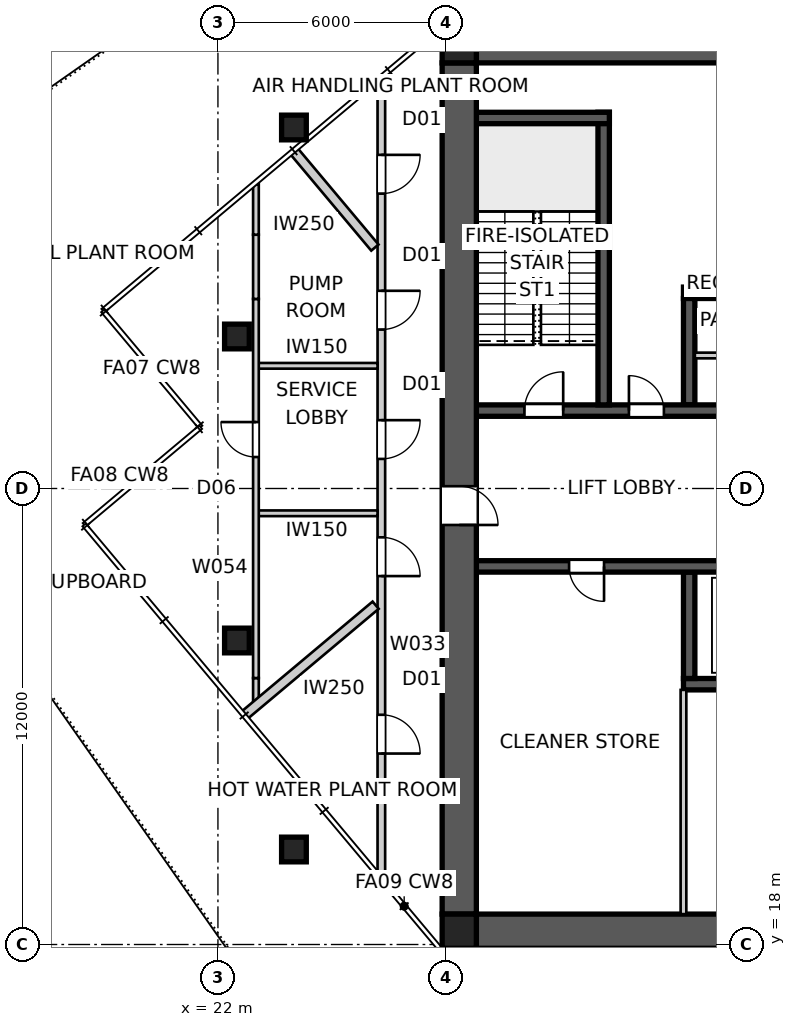
"""IFC4 building model, lengths in metres.
Left out: names, types, materials, properties, quantities, classifications, styles, units other than length and angle.
Written with IfcOpenShell. Run it as: python <this file> out.ifc"""

import sys

from ifc_helpers import new_model, si_unit, direction, frame, frame_2d, origin, origin_2d, place, context, subcontext, project, spatial, polyline, rectangle, outline, extrude, element, fill, save


model = new_model("IFC4")
c1 = context("Model", 3, precision=1e-05, world=origin(), true_north=direction((0.0, 1.0)))
c2 = subcontext(c1, "Body", "Model", "MODEL_VIEW")
j1 = project(units=[si_unit("LENGTHUNIT", "METRE"), si_unit("PLANEANGLEUNIT", "RADIAN")], contexts=[c1])
p1 = place(None, origin())
s1 = spatial("IfcSite", under=j1, at=p1, CompositionType="ELEMENT")
p2 = place(p1, origin())
s2 = spatial("IfcBuilding", under=s1, at=p2, CompositionType="ELEMENT")
p3 = place(p2, frame((0.0, 0.0, 267.6)))
s3 = spatial("IfcBuildingStorey", under=s2, at=p3, CompositionType="ELEMENT", Elevation=267.6)
for number, where, z_axis, x_axis in (
    (1, (28.8, 41.65, 0.0), (0.0, 0.0, 1.0), (1.0, 0.0, 0.0)),
    (2, (51.2, 18.35, 0.0), (0.0, 0.0, 1.0), (-1.0, 0.0, 0.0)),
):
    element("IfcWall", number, at=place(p3, frame(where, z_axis=z_axis, x_axis=x_axis)), inside=s3, PredefinedType="SHEAR", context=c2, shape_type="SweptSolid", body=[
        extrude(outline(polyline([(0.0, -0.45), (22.4, -0.45), (22.4, -0.025), (22.85, -0.025), (22.85, 0.025), (22.4, 0.025), (22.4, 0.45), (0.0, 0.45), (0.0, 0.025), (-0.45, 0.025), (-0.45, -0.025), (0.0, -0.025), (0.0, -0.45)])), origin(), (0.0, 0.0, 1.0), 5.0),
    ])
p4 = place(p3, frame((28.35, 41.2, 0.0), z_axis=(0.0, 0.0, 1.0), x_axis=(0.0, -1.0, 0.0)))
e3 = element("IfcWall", 3, at=p4, inside=s3, PredefinedType="SHEAR", context=c2, shape_type="SweptSolid", body=[
    extrude(outline(polyline([(0.0, -0.45), (22.4, -0.45), (22.4, -0.025), (22.85, -0.025), (22.85, 0.025), (22.4, 0.025), (22.4, 0.45), (0.0, 0.45), (0.0, 0.025), (-0.45, 0.025), (-0.45, -0.025), (0.0, -0.025), (0.0, -0.45)])), origin(), (0.0, 0.0, 1.0), 5.0),
])
p5 = place(p4, frame((11.14, 0.0, 0.0)))
e4 = element("IfcOpeningElement", 4, at=p5, cuts=e3, PredefinedType="OPENING", context=c2, shape_type="SweptSolid", body=[
    extrude(rectangle(XDim=1.02, YDim=2.4, at=frame_2d((0.51, 1.2))), frame((0.0, 0.46, 0.0), z_axis=(0.0, -1.0, 0.0), x_axis=(1.0, 0.0, 0.0)), (0.0, 0.0, 1.0), 0.92),
])
p6 = place(p3, frame((28.8, 32.05, 0.0), z_axis=(0.0, 0.0, 1.0), x_axis=(1.0, 0.0, 0.0)))
e5 = element("IfcWall", 5, at=p6, inside=s3, PredefinedType="SHEAR", context=c2, shape_type="SweptSolid", body=[
    extrude(rectangle(XDim=22.4, YDim=0.3, at=frame_2d((11.2, 0.0))), origin(), (0.0, 0.0, 1.0), 5.0),
])
p7 = place(p6, frame((19.04, 0.0, 0.0)))
e6 = element("IfcOpeningElement", 6, at=p7, cuts=e5, PredefinedType="OPENING", context=c2, shape_type="SweptSolid", body=[
    extrude(rectangle(XDim=0.92, YDim=2.1, at=frame_2d((0.46, 1.05))), frame((0.0, 0.16, 0.0), z_axis=(0.0, -1.0, 0.0), x_axis=(1.0, 0.0, 0.0)), (0.0, 0.0, 1.0), 0.32),
])
p8 = place(p6, frame((1.265, 0.0, 0.0)))
e7 = element("IfcOpeningElement", 7, at=p8, cuts=e5, PredefinedType="OPENING", context=c2, shape_type="SweptSolid", body=[
    extrude(rectangle(XDim=1.02, YDim=2.1, at=frame_2d((0.51, 1.05))), frame((0.0, 0.16, 0.0), z_axis=(0.0, -1.0, 0.0), x_axis=(1.0, 0.0, 0.0)), (0.0, 0.0, 1.0), 0.32),
])
p9 = place(p6, frame((4.015, 0.0, 0.0)))
e8 = element("IfcOpeningElement", 8, at=p9, cuts=e5, PredefinedType="OPENING", context=c2, shape_type="SweptSolid", body=[
    extrude(rectangle(XDim=0.92, YDim=2.1, at=frame_2d((0.46, 1.05))), frame((0.0, 0.16, 0.0), z_axis=(0.0, -1.0, 0.0), x_axis=(1.0, 0.0, 0.0)), (0.0, 0.0, 1.0), 0.32),
])
p10 = place(p6, frame((7.015, 0.0, 0.0)))
e9 = element("IfcOpeningElement", 9, at=p10, cuts=e5, PredefinedType="OPENING", context=c2, shape_type="SweptSolid", body=[
    extrude(rectangle(XDim=0.92, YDim=2.1, at=frame_2d((0.46, 1.05))), frame((0.0, 0.16, 0.0), z_axis=(0.0, -1.0, 0.0), x_axis=(1.0, 0.0, 0.0)), (0.0, 0.0, 1.0), 0.32),
])
p11 = place(p6, frame((9.34, 0.0, 0.0)))
e10 = element("IfcOpeningElement", 10, at=p11, cuts=e5, PredefinedType="OPENING", context=c2, shape_type="SweptSolid", body=[
    extrude(rectangle(XDim=0.92, YDim=2.1, at=frame_2d((0.46, 1.05))), frame((0.0, 0.16, 0.0), z_axis=(0.0, -1.0, 0.0), x_axis=(1.0, 0.0, 0.0)), (0.0, 0.0, 1.0), 0.32),
])
p12 = place(p6, frame((12.05, 0.0, 0.0)))
e11 = element("IfcOpeningElement", 11, at=p12, cuts=e5, PredefinedType="OPENING", context=c2, shape_type="SweptSolid", body=[
    extrude(rectangle(XDim=1.1, YDim=2.1, at=frame_2d((0.55, 1.05))), frame((0.0, 0.16, 0.0), z_axis=(0.0, -1.0, 0.0), x_axis=(1.0, 0.0, 0.0)), (0.0, 0.0, 1.0), 0.32),
])
p13 = place(p6, frame((14.85, 0.0, 0.0)))
e12 = element("IfcOpeningElement", 12, at=p13, cuts=e5, PredefinedType="OPENING", context=c2, shape_type="SweptSolid", body=[
    extrude(rectangle(XDim=1.1, YDim=2.1, at=frame_2d((0.55, 1.05))), frame((0.0, 0.16, 0.0), z_axis=(0.0, -1.0, 0.0), x_axis=(1.0, 0.0, 0.0)), (0.0, 0.0, 1.0), 0.32),
])
p14 = place(p3, frame((51.2, 27.95, 0.0), z_axis=(0.0, 0.0, 1.0), x_axis=(-1.0, 0.0, 0.0)))
e13 = element("IfcWall", 13, at=p14, inside=s3, PredefinedType="SHEAR", context=c2, shape_type="SweptSolid", body=[
    extrude(rectangle(XDim=22.4, YDim=0.3, at=frame_2d((11.2, 0.0))), origin(), (0.0, 0.0, 1.0), 5.0),
])
p15 = place(p14, frame((19.04, 0.0, 0.0)))
e14 = element("IfcOpeningElement", 14, at=p15, cuts=e13, PredefinedType="OPENING", context=c2, shape_type="SweptSolid", body=[
    extrude(rectangle(XDim=0.92, YDim=2.1, at=frame_2d((0.46, 1.05))), frame((0.0, 0.16, 0.0), z_axis=(0.0, -1.0, 0.0), x_axis=(1.0, 0.0, 0.0)), (0.0, 0.0, 1.0), 0.32),
])
p16 = place(p14, frame((1.265, 0.0, 0.0)))
e15 = element("IfcOpeningElement", 15, at=p16, cuts=e13, PredefinedType="OPENING", context=c2, shape_type="SweptSolid", body=[
    extrude(rectangle(XDim=1.02, YDim=2.1, at=frame_2d((0.51, 1.05))), frame((0.0, 0.16, 0.0), z_axis=(0.0, -1.0, 0.0), x_axis=(1.0, 0.0, 0.0)), (0.0, 0.0, 1.0), 0.32),
])
p17 = place(p14, frame((4.015, 0.0, 0.0)))
e16 = element("IfcOpeningElement", 16, at=p17, cuts=e13, PredefinedType="OPENING", context=c2, shape_type="SweptSolid", body=[
    extrude(rectangle(XDim=0.92, YDim=2.1, at=frame_2d((0.46, 1.05))), frame((0.0, 0.16, 0.0), z_axis=(0.0, -1.0, 0.0), x_axis=(1.0, 0.0, 0.0)), (0.0, 0.0, 1.0), 0.32),
])
p18 = place(p14, frame((9.79, 0.0, 0.0)))
e17 = element("IfcOpeningElement", 17, at=p18, cuts=e13, PredefinedType="OPENING", context=c2, shape_type="SweptSolid", body=[
    extrude(rectangle(XDim=0.92, YDim=2.1, at=frame_2d((0.46, 1.05))), frame((0.0, 0.16, 0.0), z_axis=(0.0, -1.0, 0.0), x_axis=(1.0, 0.0, 0.0)), (0.0, 0.0, 1.0), 0.32),
])
p19 = place(p14, frame((6.115, 0.0, 0.0)))
e18 = element("IfcOpeningElement", 18, at=p19, cuts=e13, PredefinedType="OPENING", context=c2, shape_type="SweptSolid", body=[
    extrude(rectangle(XDim=0.92, YDim=2.1, at=frame_2d((0.46, 1.05))), frame((0.0, 0.16, 0.0), z_axis=(0.0, -1.0, 0.0), x_axis=(1.0, 0.0, 0.0)), (0.0, 0.0, 1.0), 0.32),
])
p20 = place(p14, frame((12.05, 0.0, 0.0)))
e19 = element("IfcOpeningElement", 19, at=p20, cuts=e13, PredefinedType="OPENING", context=c2, shape_type="SweptSolid", body=[
    extrude(rectangle(XDim=1.1, YDim=2.1, at=frame_2d((0.55, 1.05))), frame((0.0, 0.16, 0.0), z_axis=(0.0, -1.0, 0.0), x_axis=(1.0, 0.0, 0.0)), (0.0, 0.0, 1.0), 0.32),
])
p21 = place(p14, frame((14.85, 0.0, 0.0)))
e20 = element("IfcOpeningElement", 20, at=p21, cuts=e13, PredefinedType="OPENING", context=c2, shape_type="SweptSolid", body=[
    extrude(rectangle(XDim=1.1, YDim=2.1, at=frame_2d((0.55, 1.05))), frame((0.0, 0.16, 0.0), z_axis=(0.0, -1.0, 0.0), x_axis=(1.0, 0.0, 0.0)), (0.0, 0.0, 1.0), 0.32),
])
for number, where, z_axis, x_axis in (
    (21, (34.25, 35.15, 0.0), (0.0, 0.0, 1.0), (1.0, 0.0, 0.0)),
    (22, (45.75, 24.85, 0.0), (0.0, 0.0, 1.0), (-1.0, 0.0, 0.0)),
):
    element("IfcWall", number, at=place(p3, frame(where, z_axis=z_axis, x_axis=x_axis)), inside=s3, PredefinedType="SHEAR", context=c2, shape_type="SweptSolid", body=[
        extrude(rectangle(XDim=11.5, YDim=0.3, at=frame_2d((5.75, 0.0))), origin(), (0.0, 0.0, 1.0), 5.0),
    ])
for number, where, z_axis, x_axis in (
    (23, (34.4, 32.2, 0.0), (0.0, 0.0, 1.0), (0.0, 1.0, 0.0)),
    (24, (34.4, 27.8, 0.0), (0.0, 0.0, 1.0), (0.0, -1.0, 0.0)),
):
    element("IfcWall", number, at=place(p3, frame(where, z_axis=z_axis, x_axis=x_axis)), inside=s3, PredefinedType="SHEAR", context=c2, shape_type="SweptSolid", body=[
        extrude(rectangle(XDim=2.8, YDim=0.3, at=frame_2d((1.4, 0.0))), origin(), (0.0, 0.0, 1.0), 5.0),
    ])
p22 = place(p3, frame((32.15, 32.2, 0.0), z_axis=(0.0, 0.0, 1.0), x_axis=(0.0, 1.0, 0.0)))
e25 = element("IfcWall", 25, at=p22, inside=s3, PredefinedType="SHEAR", context=c2, shape_type="SweptSolid", body=[
    extrude(rectangle(XDim=7.7, YDim=0.3, at=frame_2d((3.85, 0.0))), origin(), (0.0, 0.0, 1.0), 5.0),
])
p23 = place(p3, frame((28.8, 39.75, 0.0), z_axis=(0.0, 0.0, 1.0), x_axis=(1.0, 0.0, 0.0)))
e26 = element("IfcWall", 26, at=p23, inside=s3, PredefinedType="SHEAR", context=c2, shape_type="SweptSolid", body=[
    extrude(rectangle(XDim=3.5, YDim=0.3, at=frame_2d((1.75, 0.0))), origin(), (0.0, 0.0, 1.0), 5.0),
])
for number, where, z_axis, x_axis in (
    (27, (28.35, 18.35, 0.0), (0.0, 0.0, 1.0), (1.0, 0.0, 0.0)),
    (28, (28.35, 41.65, 0.0), (0.0, 0.0, 1.0), (1.0, 0.0, 0.0)),
):
    element("IfcColumn", number, at=place(p3, frame(where, z_axis=z_axis, x_axis=x_axis)), inside=s3, PredefinedType="COLUMN", context=c2, shape_type="SweptSolid", body=[
        extrude(rectangle(XDim=0.9, YDim=0.9, at=origin_2d()), origin(), (0.0, 0.0, 1.0), 5.0),
    ])
for number, where, z_axis, x_axis in (
    (29, (24.0, 39.5, 0.0), (0.0, 0.0, 1.0), (1.0, 0.0, 0.0)),
    (30, (22.5, 34.0, 0.0), (0.0, 0.0, 1.0), (1.0, 0.0, 0.0)),
    (31, (22.5, 26.0, 0.0), (0.0, 0.0, 1.0), (1.0, 0.0, 0.0)),
    (32, (24.0, 20.5, 0.0), (0.0, 0.0, 1.0), (1.0, 0.0, 0.0)),
):
    element("IfcColumn", number, at=place(p3, frame(where, z_axis=z_axis, x_axis=x_axis)), inside=s3, PredefinedType="COLUMN", context=c2, shape_type="SweptSolid", body=[
        extrude(rectangle(XDim=0.65, YDim=0.65, at=origin_2d()), origin(), (0.0, 0.0, 1.0), 5.0),
    ])
p24 = place(p3, frame((26.3, 40.775, 0.0), z_axis=(0.0, 0.0, 1.0), x_axis=(0.0, -1.0, 0.0)))
e33 = element("IfcWall", 33, at=p24, inside=s3, PredefinedType="PARTITIONING", context=c2, shape_type="SweptSolid", body=[
    extrude(rectangle(XDim=20.988, YDim=0.2, at=frame_2d((10.494, 0.0))), origin(), (0.0, 0.0, 1.0), 4.85),
])
p25 = place(p24, frame((16.729, 0.0, 0.0)))
e34 = element("IfcOpeningElement", 34, at=p25, cuts=e33, PredefinedType="OPENING", context=c2, shape_type="SweptSolid", body=[
    extrude(rectangle(XDim=1.02, YDim=2.34, at=frame_2d((0.51, 1.17))), frame((0.0, 0.11, 0.0), z_axis=(0.0, -1.0, 0.0), x_axis=(1.0, 0.0, 0.0)), (0.0, 0.0, 1.0), 0.22),
])
p26 = place(p24, frame((1.995, 0.0, 0.0)))
e35 = element("IfcOpeningElement", 35, at=p26, cuts=e33, PredefinedType="OPENING", context=c2, shape_type="SweptSolid", body=[
    extrude(rectangle(XDim=1.02, YDim=2.34, at=frame_2d((0.51, 1.17))), frame((0.0, 0.11, 0.0), z_axis=(0.0, -1.0, 0.0), x_axis=(1.0, 0.0, 0.0)), (0.0, 0.0, 1.0), 0.22),
])
p27 = place(p24, frame((8.976, 0.0, 0.0)))
e36 = element("IfcOpeningElement", 36, at=p27, cuts=e33, PredefinedType="OPENING", context=c2, shape_type="SweptSolid", body=[
    extrude(rectangle(XDim=1.02, YDim=2.34, at=frame_2d((0.51, 1.17))), frame((0.0, 0.11, 0.0), z_axis=(0.0, -1.0, 0.0), x_axis=(1.0, 0.0, 0.0)), (0.0, 0.0, 1.0), 0.22),
])
p28 = place(p24, frame((5.572, 0.0, 0.0)))
e37 = element("IfcOpeningElement", 37, at=p28, cuts=e33, PredefinedType="OPENING", context=c2, shape_type="SweptSolid", body=[
    extrude(rectangle(XDim=1.02, YDim=2.34, at=frame_2d((0.51, 1.17))), frame((0.0, 0.11, 0.0), z_axis=(0.0, -1.0, 0.0), x_axis=(1.0, 0.0, 0.0)), (0.0, 0.0, 1.0), 0.22),
])
p29 = place(p24, frame((12.06, 0.0, 0.0)))
e38 = element("IfcOpeningElement", 38, at=p29, cuts=e33, PredefinedType="OPENING", context=c2, shape_type="SweptSolid", body=[
    extrude(rectangle(XDim=1.02, YDim=2.34, at=frame_2d((0.51, 1.17))), frame((0.0, 0.11, 0.0), z_axis=(0.0, -1.0, 0.0), x_axis=(1.0, 0.0, 0.0)), (0.0, 0.0, 1.0), 0.22),
])
p30 = place(p3, frame((23.991, 38.889, 0.0), z_axis=(0.0, 0.0, 1.0), x_axis=(0.642756724565, -0.766070357753, 0.0)))
e39 = element("IfcWall", 39, at=p30, inside=s3, PredefinedType="PARTITIONING", context=c2, shape_type="SweptSolid", body=[
    extrude(rectangle(XDim=3.328, YDim=0.25, at=frame_2d((1.664, 0.0))), origin(), (0.0, 0.0, 1.0), 4.85),
])
p31 = place(p3, frame((22.69, 24.026, 0.0), z_axis=(0.0, 0.0, 1.0), x_axis=(0.766036989917, 0.642796491962, 0.0)))
e40 = element("IfcWall", 40, at=p31, inside=s3, PredefinedType="PARTITIONING", context=c2, shape_type="SweptSolid", body=[
    extrude(rectangle(XDim=4.517, YDim=0.25, at=frame_2d((2.258, 0.0))), origin(), (0.0, 0.0, 1.0), 4.85),
])
p32 = place(p3, frame((34.25, 18.8, 0.0), z_axis=(0.0, 0.0, 1.0), x_axis=(0.0, 1.0, 0.0)))
e41 = element("IfcWall", 41, at=p32, inside=s3, PredefinedType="SOLIDWALL", context=c2, shape_type="SweptSolid", body=[
    extrude(rectangle(XDim=5.9, YDim=0.15, at=frame_2d((2.95, 0.0))), origin(), (0.0, 0.0, 1.0), 4.85),
])
for number, where, z_axis, x_axis in (
    (42, (23.0, 33.229, 0.0), (0.0, 0.0, 1.0), (1.0, 0.0, 0.0)),
    (43, (26.2, 29.348, 0.0), (0.0, 0.0, 1.0), (-1.0, 0.0, 0.0)),
):
    element("IfcWall", number, at=place(p3, frame(where, z_axis=z_axis, x_axis=x_axis)), inside=s3, PredefinedType="SOLIDWALL", context=c2, shape_type="SweptSolid", body=[
        extrude(rectangle(XDim=3.2, YDim=0.15, at=frame_2d((1.6, 0.0))), origin(), (0.0, 0.0, 1.0), 4.85),
    ])
p33 = place(p3, frame((23.0, 24.286, 0.0), z_axis=(0.0, 0.0, 1.0), x_axis=(0.0, 1.0, 0.0)))
e44 = element("IfcWall", 44, at=p33, inside=s3, PredefinedType="SOLIDWALL", context=c2, shape_type="SweptSolid", body=[
    extrude(rectangle(XDim=0.726, YDim=0.15, at=frame_2d((0.363, 0.0))), origin(), (0.0, 0.0, 1.0), 3.85),
])
p34 = place(p3, frame((23.0, 25.012, 0.0), z_axis=(0.0, 0.0, 1.0), x_axis=(0.0, 1.0, 0.0)))
e45 = element("IfcWall", 45, at=p34, inside=s3, PredefinedType="SOLIDWALL", context=c2, shape_type="SweptSolid", body=[
    extrude(rectangle(XDim=9.977, YDim=0.15, at=frame_2d((4.988, 0.0))), origin(), (0.0, 0.0, 1.0), 4.85),
])
p35 = place(p34, frame((5.816, 0.0, 0.0)))
e46 = element("IfcOpeningElement", 46, at=p35, cuts=e45, PredefinedType="OPENING", context=c2, shape_type="SweptSolid", body=[
    extrude(rectangle(XDim=0.92, YDim=2.1, at=frame_2d((0.46, 1.05))), frame((0.0, 0.085, 0.0), z_axis=(0.0, -1.0, 0.0), x_axis=(1.0, 0.0, 0.0)), (0.0, 0.0, 1.0), 0.17),
])
p36 = place(p3, frame((23.0, 34.988, 0.0), z_axis=(0.0, 0.0, 1.0), x_axis=(0.0, 1.0, 0.0)))
e47 = element("IfcWall", 47, at=p36, inside=s3, PredefinedType="SOLIDWALL", context=c2, shape_type="SweptSolid", body=[
    extrude(rectangle(XDim=1.69, YDim=0.15, at=frame_2d((0.845, 0.0))), origin(), (0.0, 0.0, 1.0), 3.85),
])
p37 = place(p3, frame((23.0, 36.678, 0.0), z_axis=(0.0, 0.0, 1.0), x_axis=(0.0, 1.0, 0.0)))
e48 = element("IfcWall", 48, at=p37, inside=s3, PredefinedType="SOLIDWALL", context=c2, shape_type="SweptSolid", body=[
    extrude(rectangle(XDim=1.327, YDim=0.15, at=frame_2d((0.664, 0.0))), origin(), (0.0, 0.0, 1.0), 4.85),
])
p38 = place(p3, frame((34.55, 33.5, 0.0), z_axis=(0.0, 0.0, 1.0), x_axis=(1.0, 0.0, 0.0)))
e49 = element("IfcWall", 49, at=p38, inside=s3, PredefinedType="SOLIDWALL", context=c2, shape_type="SweptSolid", body=[
    extrude(rectangle(XDim=5.35, YDim=0.15, at=frame_2d((2.675, 0.0))), origin(), (0.0, 0.0, 1.0), 4.85),
])
p39 = place(p38, frame((2.215, 0.0, 0.0)))
e50 = element("IfcOpeningElement", 50, at=p39, cuts=e49, PredefinedType="OPENING", context=c2, shape_type="SweptSolid", body=[
    extrude(rectangle(XDim=0.92, YDim=2.1, at=frame_2d((0.46, 1.05))), frame((0.0, 0.085, 0.0), z_axis=(0.0, -1.0, 0.0), x_axis=(1.0, 0.0, 0.0)), (0.0, 0.0, 1.0), 0.17),
])
p40 = place(p15, origin())
e51 = element("IfcDoor", 51, at=p40, inside=s3, OperationType="SINGLE_SWING_LEFT", PredefinedType="DOOR", context=c2, shape_type="SweptSolid", body=[
    extrude(rectangle(XDim=0.92, YDim=2.1, at=frame_2d((0.46, 1.05))), frame((0.0, 0.025, 0.0), z_axis=(0.0, -1.0, 0.0), x_axis=(1.0, 0.0, 0.0)), (0.0, 0.0, 1.0), 0.05),
])
fill(e14, e51)
p41 = place(p8, origin())
e52 = element("IfcDoor", 52, at=p41, inside=s3, OperationType="SINGLE_SWING_RIGHT", PredefinedType="DOOR", context=c2, shape_type="SweptSolid", body=[
    extrude(rectangle(XDim=1.02, YDim=2.1, at=frame_2d((0.51, 1.05))), frame((0.0, 0.025, 0.0), z_axis=(0.0, -1.0, 0.0), x_axis=(1.0, 0.0, 0.0)), (0.0, 0.0, 1.0), 0.05),
])
fill(e7, e52)
p42 = place(p9, origin())
e53 = element("IfcDoor", 53, at=p42, inside=s3, OperationType="SINGLE_SWING_LEFT", PredefinedType="DOOR", context=c2, shape_type="SweptSolid", body=[
    extrude(rectangle(XDim=0.92, YDim=2.1, at=frame_2d((0.46, 1.05))), frame((0.0, 0.025, 0.0), z_axis=(0.0, -1.0, 0.0), x_axis=(1.0, 0.0, 0.0)), (0.0, 0.0, 1.0), 0.05),
])
fill(e8, e53)
p43 = place(p25, origin())
e54 = element("IfcDoor", 54, at=p43, inside=s3, OperationType="SINGLE_SWING_RIGHT", PredefinedType="DOOR", context=c2, shape_type="SweptSolid", body=[
    extrude(rectangle(XDim=1.02, YDim=2.34, at=frame_2d((0.51, 1.17))), frame((0.0, 0.025, 0.0), z_axis=(0.0, -1.0, 0.0), x_axis=(1.0, 0.0, 0.0)), (0.0, 0.0, 1.0), 0.05),
])
fill(e34, e54)
p44 = place(p26, origin())
e55 = element("IfcDoor", 55, at=p44, inside=s3, OperationType="SINGLE_SWING_LEFT", PredefinedType="DOOR", context=c2, shape_type="SweptSolid", body=[
    extrude(rectangle(XDim=1.02, YDim=2.34, at=frame_2d((0.51, 1.17))), frame((0.0, 0.025, 0.0), z_axis=(0.0, -1.0, 0.0), x_axis=(1.0, 0.0, 0.0)), (0.0, 0.0, 1.0), 0.05),
])
fill(e35, e55)
p45 = place(p27, origin())
e56 = element("IfcDoor", 56, at=p45, inside=s3, OperationType="SINGLE_SWING_LEFT", PredefinedType="DOOR", context=c2, shape_type="SweptSolid", body=[
    extrude(rectangle(XDim=1.02, YDim=2.34, at=frame_2d((0.51, 1.17))), frame((0.0, 0.025, 0.0), z_axis=(0.0, -1.0, 0.0), x_axis=(1.0, 0.0, 0.0)), (0.0, 0.0, 1.0), 0.05),
])
fill(e36, e56)
p46 = place(p28, origin())
e57 = element("IfcDoor", 57, at=p46, inside=s3, OperationType="SINGLE_SWING_LEFT", PredefinedType="DOOR", context=c2, shape_type="SweptSolid", body=[
    extrude(rectangle(XDim=1.02, YDim=2.34, at=frame_2d((0.51, 1.17))), frame((0.0, 0.025, 0.0), z_axis=(0.0, -1.0, 0.0), x_axis=(1.0, 0.0, 0.0)), (0.0, 0.0, 1.0), 0.05),
])
fill(e37, e57)
p47 = place(p29, origin())
e58 = element("IfcDoor", 58, at=p47, inside=s3, OperationType="SINGLE_SWING_RIGHT", PredefinedType="DOOR", context=c2, shape_type="SweptSolid", body=[
    extrude(rectangle(XDim=1.02, YDim=2.34, at=frame_2d((0.51, 1.17))), frame((0.0, 0.025, 0.0), z_axis=(0.0, -1.0, 0.0), x_axis=(1.0, 0.0, 0.0)), (0.0, 0.0, 1.0), 0.05),
])
fill(e38, e58)
p48 = place(p35, origin())
e59 = element("IfcDoor", 59, at=p48, inside=s3, OperationType="SINGLE_SWING_RIGHT", PredefinedType="DOOR", context=c2, shape_type="SweptSolid", body=[
    extrude(rectangle(XDim=0.92, YDim=2.1, at=frame_2d((0.46, 1.05))), frame((0.0, 0.025, 0.0), z_axis=(0.0, -1.0, 0.0), x_axis=(1.0, 0.0, 0.0)), (0.0, 0.0, 1.0), 0.05),
])
fill(e46, e59)
p49 = place(p5, origin())
e60 = element("IfcDoor", 60, at=p49, inside=s3, OperationType="SINGLE_SWING_RIGHT", PredefinedType="DOOR", context=c2, shape_type="SweptSolid", body=[
    extrude(rectangle(XDim=1.02, YDim=2.4, at=frame_2d((0.51, 1.2))), frame((0.0, 0.025, 0.0), z_axis=(0.0, -1.0, 0.0), x_axis=(1.0, 0.0, 0.0)), (0.0, 0.0, 1.0), 0.05),
])
fill(e4, e60)
save(model, sys.argv[1])
